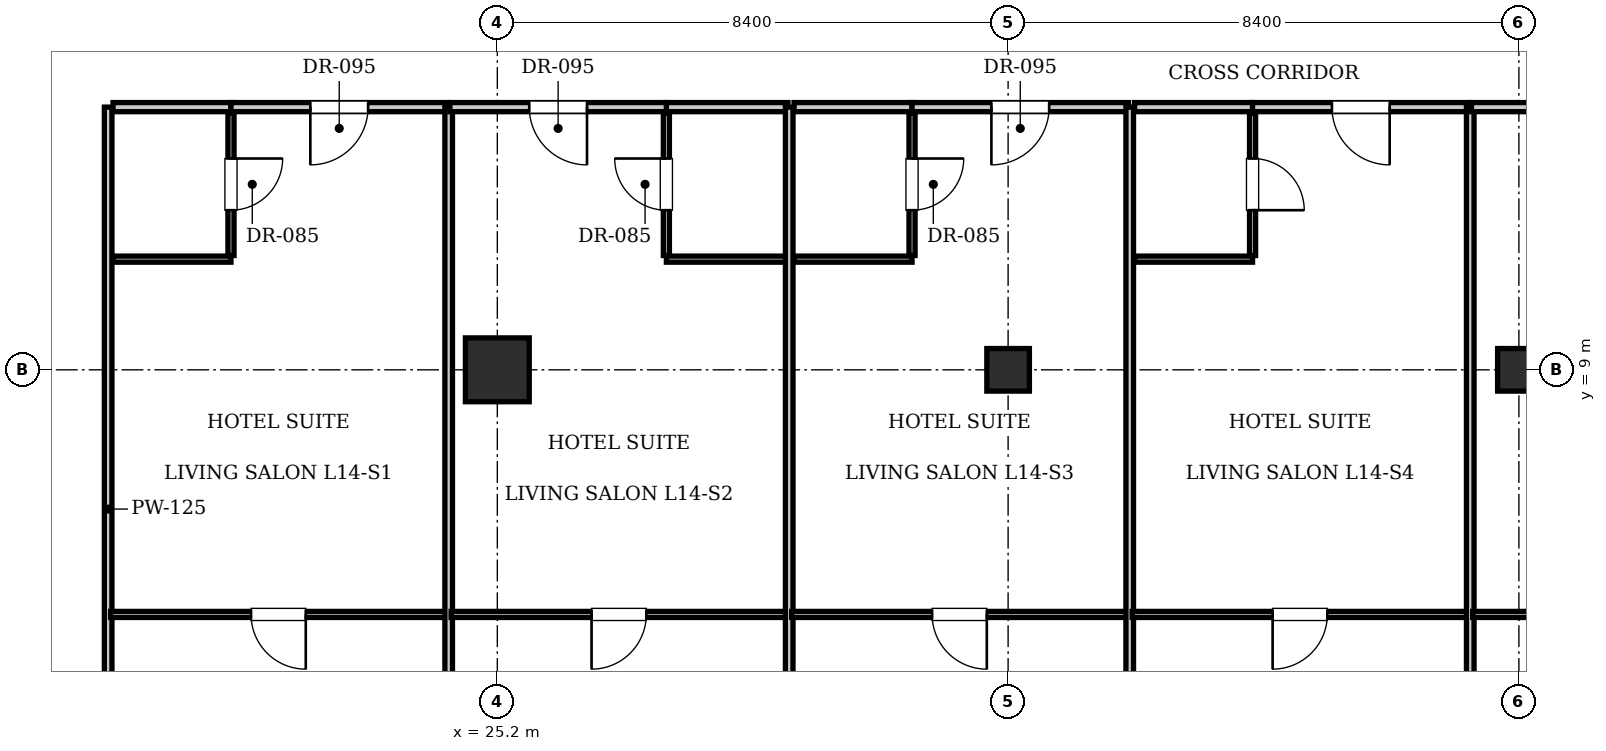
"""IFC4 building model, lengths in metres.
Left out: names, types, materials, properties, quantities, classifications, styles, units other than length and angle.
Written with IfcOpenShell. Run it as: python <this file> out.ifc"""

import sys

from ifc_helpers import new_model, si_unit, direction, frame, frame_2d, origin, origin_2d, place, context, subcontext, project, spatial, rectangle, i_section, extrude, element, fill, save


model = new_model("IFC4")
c1 = context("Model", 3, precision=1e-05, world=origin(), true_north=direction((0.0, 1.0)))
c2 = subcontext(c1, "Body", "Model", "MODEL_VIEW")
j1 = project(units=[si_unit("LENGTHUNIT", "METRE"), si_unit("PLANEANGLEUNIT", "RADIAN")], contexts=[c1])
p1 = place(None, origin())
s1 = spatial("IfcSite", under=j1, at=p1, CompositionType="ELEMENT")
p2 = place(p1, origin())
s2 = spatial("IfcBuilding", under=s1, at=p2, CompositionType="ELEMENT")
p3 = place(p2, frame((0.0, 0.0, 61.6)))
s3 = spatial("IfcBuildingStorey", under=s2, at=p3, CompositionType="ELEMENT", Elevation=61.6)
p4 = place(p3, frame((25.2, 9.0, 0.0), z_axis=(0.0, 0.0, 1.0), x_axis=(1.0, 0.0, 0.0)))
e1 = element("IfcColumn", 1, at=p4, inside=s3, PredefinedType="COLUMN", context=c2, shape_type="SweptSolid", body=[
    extrude(rectangle(XDim=1.05, YDim=1.05, at=origin_2d()), origin(), (0.0, 0.0, 1.0), 3.85),
])
for number, where, z_axis, x_axis in (
    (2, (33.6, 9.0, 0.0), (0.0, 0.0, 1.0), (1.0, 0.0, 0.0)),
    (3, (42.0, 9.0, 0.0), (0.0, 0.0, 1.0), (1.0, 0.0, 0.0)),
):
    element("IfcColumn", number, at=place(p3, frame(where, z_axis=z_axis, x_axis=x_axis)), inside=s3, PredefinedType="COLUMN", context=c2, shape_type="SweptSolid", body=[
        extrude(i_section(OverallWidth=0.7, OverallDepth=0.7, WebThickness=0.028, FlangeThickness=0.044, at=origin_2d()), origin(), (0.0, 0.0, 1.0), 3.85),
    ])
p5 = place(p3, frame((18.8, 0.1, 0.0), z_axis=(0.0, 0.0, 1.0), x_axis=(0.0, 1.0, 0.0)))
e4 = element("IfcWall", 4, at=p5, inside=s3, PredefinedType="PARTITIONING", context=c2, shape_type="SweptSolid", body=[
    extrude(rectangle(XDim=13.22, YDim=0.125, at=frame_2d((6.61, 0.0))), origin(), (0.0, 0.0, 1.0), 3.61),
])
p6 = place(p3, frame((18.88, 13.32, 0.0), z_axis=(0.0, 0.0, 1.0), x_axis=(1.0, 0.0, 0.0)))
e5 = element("IfcWall", 5, at=p6, inside=s3, PredefinedType="PARTITIONING", context=c2, shape_type="SweptSolid", body=[
    extrude(rectangle(XDim=1.94, YDim=0.15, at=frame_2d((0.97, 0.0))), origin(), (0.0, 0.0, 1.0), 3.61),
])
p7 = place(p3, frame((18.88, 10.82, 0.0), z_axis=(0.0, 0.0, 1.0), x_axis=(1.0, 0.0, 0.0)))
e6 = element("IfcWall", 6, at=p7, inside=s3, PredefinedType="PARTITIONING", context=c2, shape_type="SweptSolid", body=[
    extrude(rectangle(XDim=1.94, YDim=0.1, at=frame_2d((0.97, 0.0))), origin(), (0.0, 0.0, 1.0), 3.61),
])
p8 = place(p3, frame((20.82, 10.88, 0.0), z_axis=(0.0, 0.0, 1.0), x_axis=(0.0, 1.0, 0.0)))
e7 = element("IfcWall", 7, at=p8, inside=s3, PredefinedType="PARTITIONING", context=c2, shape_type="SweptSolid", body=[
    extrude(rectangle(XDim=2.34, YDim=0.1, at=frame_2d((1.17, 0.0))), origin(), (0.0, 0.0, 1.0), 3.61),
])
p9 = place(p8, frame((0.745, 0.0, 0.0)))
e8 = element("IfcOpeningElement", 8, at=p9, cuts=e7, PredefinedType="OPENING", context=c2, shape_type="SweptSolid", body=[
    extrude(rectangle(XDim=0.85, YDim=2.1, at=frame_2d((0.425, 1.05))), frame((0.0, 0.06, 0.0), z_axis=(0.0, -1.0, 0.0), x_axis=(1.0, 0.0, 0.0)), (0.0, 0.0, 1.0), 0.12),
])
p10 = place(p3, frame((20.82, 13.32, 0.0), z_axis=(0.0, 0.0, 1.0), x_axis=(1.0, 0.0, 0.0)))
e9 = element("IfcWall", 9, at=p10, inside=s3, PredefinedType="PARTITIONING", context=c2, shape_type="SweptSolid", body=[
    extrude(rectangle(XDim=3.56, YDim=0.15, at=frame_2d((1.78, 0.0))), origin(), (0.0, 0.0, 1.0), 3.61),
])
p11 = place(p10, frame((1.305, 0.0, 0.0)))
e10 = element("IfcOpeningElement", 10, at=p11, cuts=e9, PredefinedType="OPENING", context=c2, shape_type="SweptSolid", body=[
    extrude(rectangle(XDim=0.95, YDim=2.15, at=frame_2d((0.475, 1.075))), frame((0.0, 0.085, 0.0), z_axis=(0.0, -1.0, 0.0), x_axis=(1.0, 0.0, 0.0)), (0.0, 0.0, 1.0), 0.17),
])
p12 = place(p3, frame((18.84, 4.977, 0.0), z_axis=(0.0, 0.0, 1.0), x_axis=(1.0, 0.0, 0.0)))
e11 = element("IfcWall", 11, at=p12, inside=s3, PredefinedType="PARTITIONING", context=c2, shape_type="SweptSolid", body=[
    extrude(rectangle(XDim=5.52, YDim=0.1, at=frame_2d((2.76, 0.0))), origin(), (0.0, 0.0, 1.0), 3.61),
])
p13 = place(p12, frame((2.31, 0.0, 0.0)))
e12 = element("IfcOpeningElement", 12, at=p13, cuts=e11, PredefinedType="OPENING", context=c2, shape_type="SweptSolid", body=[
    extrude(rectangle(XDim=0.9, YDim=2.1, at=frame_2d((0.45, 1.05))), frame((0.0, 0.06, 0.0), z_axis=(0.0, -1.0, 0.0), x_axis=(1.0, 0.0, 0.0)), (0.0, 0.0, 1.0), 0.12),
])
p14 = place(p3, frame((24.4, 0.1, 0.0), z_axis=(0.0, 0.0, 1.0), x_axis=(0.0, 1.0, 0.0)))
e13 = element("IfcWall", 13, at=p14, inside=s3, PredefinedType="PARTITIONING", context=c2, shape_type="SweptSolid", body=[
    extrude(rectangle(XDim=13.22, YDim=0.125, at=frame_2d((6.61, 0.0))), origin(), (0.0, 0.0, 1.0), 3.61),
])
p15 = place(p3, frame((27.98, 13.32, 0.0), z_axis=(0.0, 0.0, 1.0), x_axis=(1.0, 0.0, 0.0)))
e14 = element("IfcWall", 14, at=p15, inside=s3, PredefinedType="PARTITIONING", context=c2, shape_type="SweptSolid", body=[
    extrude(rectangle(XDim=2.0, YDim=0.15, at=frame_2d((1.0, 0.0))), origin(), (0.0, 0.0, 1.0), 3.61),
])
p16 = place(p3, frame((27.98, 10.82, 0.0), z_axis=(0.0, 0.0, 1.0), x_axis=(1.0, 0.0, 0.0)))
e15 = element("IfcWall", 15, at=p16, inside=s3, PredefinedType="PARTITIONING", context=c2, shape_type="SweptSolid", body=[
    extrude(rectangle(XDim=1.98, YDim=0.1, at=frame_2d((0.99, 0.0))), origin(), (0.0, 0.0, 1.0), 3.61),
])
p17 = place(p3, frame((27.98, 10.88, 0.0), z_axis=(0.0, 0.0, 1.0), x_axis=(0.0, 1.0, 0.0)))
e16 = element("IfcWall", 16, at=p17, inside=s3, PredefinedType="PARTITIONING", context=c2, shape_type="SweptSolid", body=[
    extrude(rectangle(XDim=2.34, YDim=0.1, at=frame_2d((1.17, 0.0))), origin(), (0.0, 0.0, 1.0), 3.61),
])
p18 = place(p17, frame((0.745, 0.0, 0.0)))
e17 = element("IfcOpeningElement", 17, at=p18, cuts=e16, PredefinedType="OPENING", context=c2, shape_type="SweptSolid", body=[
    extrude(rectangle(XDim=0.85, YDim=2.1, at=frame_2d((0.425, 1.05))), frame((0.0, 0.06, 0.0), z_axis=(0.0, -1.0, 0.0), x_axis=(1.0, 0.0, 0.0)), (0.0, 0.0, 1.0), 0.12),
])
p19 = place(p3, frame((24.42, 13.32, 0.0), z_axis=(0.0, 0.0, 1.0), x_axis=(1.0, 0.0, 0.0)))
e18 = element("IfcWall", 18, at=p19, inside=s3, PredefinedType="PARTITIONING", context=c2, shape_type="SweptSolid", body=[
    extrude(rectangle(XDim=3.56, YDim=0.15, at=frame_2d((1.78, 0.0))), origin(), (0.0, 0.0, 1.0), 3.61),
])
p20 = place(p19, frame((1.305, 0.0, 0.0)))
e19 = element("IfcOpeningElement", 19, at=p20, cuts=e18, PredefinedType="OPENING", context=c2, shape_type="SweptSolid", body=[
    extrude(rectangle(XDim=0.95, YDim=2.15, at=frame_2d((0.475, 1.075))), frame((0.0, 0.085, 0.0), z_axis=(0.0, -1.0, 0.0), x_axis=(1.0, 0.0, 0.0)), (0.0, 0.0, 1.0), 0.17),
])
p21 = place(p3, frame((24.44, 4.977, 0.0), z_axis=(0.0, 0.0, 1.0), x_axis=(1.0, 0.0, 0.0)))
e20 = element("IfcWall", 20, at=p21, inside=s3, PredefinedType="PARTITIONING", context=c2, shape_type="SweptSolid", body=[
    extrude(rectangle(XDim=5.52, YDim=0.1, at=frame_2d((2.76, 0.0))), origin(), (0.0, 0.0, 1.0), 3.61),
])
p22 = place(p21, frame((2.31, 0.0, 0.0)))
e21 = element("IfcOpeningElement", 21, at=p22, cuts=e20, PredefinedType="OPENING", context=c2, shape_type="SweptSolid", body=[
    extrude(rectangle(XDim=0.9, YDim=2.1, at=frame_2d((0.45, 1.05))), frame((0.0, 0.06, 0.0), z_axis=(0.0, -1.0, 0.0), x_axis=(1.0, 0.0, 0.0)), (0.0, 0.0, 1.0), 0.12),
])
p23 = place(p3, frame((30.0, 0.1, 0.0), z_axis=(0.0, 0.0, 1.0), x_axis=(0.0, 1.0, 0.0)))
e22 = element("IfcWall", 22, at=p23, inside=s3, PredefinedType="PARTITIONING", context=c2, shape_type="SweptSolid", body=[
    extrude(rectangle(XDim=13.22, YDim=0.125, at=frame_2d((6.61, 0.0))), origin(), (0.0, 0.0, 1.0), 3.61),
])
p24 = place(p3, frame((30.08, 13.32, 0.0), z_axis=(0.0, 0.0, 1.0), x_axis=(1.0, 0.0, 0.0)))
e23 = element("IfcWall", 23, at=p24, inside=s3, PredefinedType="PARTITIONING", context=c2, shape_type="SweptSolid", body=[
    extrude(rectangle(XDim=1.94, YDim=0.15, at=frame_2d((0.97, 0.0))), origin(), (0.0, 0.0, 1.0), 3.61),
])
p25 = place(p3, frame((30.08, 10.82, 0.0), z_axis=(0.0, 0.0, 1.0), x_axis=(1.0, 0.0, 0.0)))
e24 = element("IfcWall", 24, at=p25, inside=s3, PredefinedType="PARTITIONING", context=c2, shape_type="SweptSolid", body=[
    extrude(rectangle(XDim=1.94, YDim=0.1, at=frame_2d((0.97, 0.0))), origin(), (0.0, 0.0, 1.0), 3.61),
])
p26 = place(p3, frame((32.02, 10.88, 0.0), z_axis=(0.0, 0.0, 1.0), x_axis=(0.0, 1.0, 0.0)))
e25 = element("IfcWall", 25, at=p26, inside=s3, PredefinedType="PARTITIONING", context=c2, shape_type="SweptSolid", body=[
    extrude(rectangle(XDim=2.34, YDim=0.1, at=frame_2d((1.17, 0.0))), origin(), (0.0, 0.0, 1.0), 3.61),
])
p27 = place(p26, frame((0.745, 0.0, 0.0)))
e26 = element("IfcOpeningElement", 26, at=p27, cuts=e25, PredefinedType="OPENING", context=c2, shape_type="SweptSolid", body=[
    extrude(rectangle(XDim=0.85, YDim=2.1, at=frame_2d((0.425, 1.05))), frame((0.0, 0.06, 0.0), z_axis=(0.0, -1.0, 0.0), x_axis=(1.0, 0.0, 0.0)), (0.0, 0.0, 1.0), 0.12),
])
p28 = place(p3, frame((32.02, 13.32, 0.0), z_axis=(0.0, 0.0, 1.0), x_axis=(1.0, 0.0, 0.0)))
e27 = element("IfcWall", 27, at=p28, inside=s3, PredefinedType="PARTITIONING", context=c2, shape_type="SweptSolid", body=[
    extrude(rectangle(XDim=3.56, YDim=0.15, at=frame_2d((1.78, 0.0))), origin(), (0.0, 0.0, 1.0), 3.61),
])
p29 = place(p28, frame((1.305, 0.0, 0.0)))
e28 = element("IfcOpeningElement", 28, at=p29, cuts=e27, PredefinedType="OPENING", context=c2, shape_type="SweptSolid", body=[
    extrude(rectangle(XDim=0.95, YDim=2.15, at=frame_2d((0.475, 1.075))), frame((0.0, 0.085, 0.0), z_axis=(0.0, -1.0, 0.0), x_axis=(1.0, 0.0, 0.0)), (0.0, 0.0, 1.0), 0.17),
])
p30 = place(p3, frame((30.04, 4.977, 0.0), z_axis=(0.0, 0.0, 1.0), x_axis=(1.0, 0.0, 0.0)))
e29 = element("IfcWall", 29, at=p30, inside=s3, PredefinedType="PARTITIONING", context=c2, shape_type="SweptSolid", body=[
    extrude(rectangle(XDim=5.52, YDim=0.1, at=frame_2d((2.76, 0.0))), origin(), (0.0, 0.0, 1.0), 3.61),
])
p31 = place(p30, frame((2.31, 0.0, 0.0)))
e30 = element("IfcOpeningElement", 30, at=p31, cuts=e29, PredefinedType="OPENING", context=c2, shape_type="SweptSolid", body=[
    extrude(rectangle(XDim=0.9, YDim=2.1, at=frame_2d((0.45, 1.05))), frame((0.0, 0.06, 0.0), z_axis=(0.0, -1.0, 0.0), x_axis=(1.0, 0.0, 0.0)), (0.0, 0.0, 1.0), 0.12),
])
p32 = place(p3, frame((35.6, 0.1, 0.0), z_axis=(0.0, 0.0, 1.0), x_axis=(0.0, 1.0, 0.0)))
e31 = element("IfcWall", 31, at=p32, inside=s3, PredefinedType="PARTITIONING", context=c2, shape_type="SweptSolid", body=[
    extrude(rectangle(XDim=13.22, YDim=0.125, at=frame_2d((6.61, 0.0))), origin(), (0.0, 0.0, 1.0), 3.61),
])
p33 = place(p3, frame((35.68, 13.32, 0.0), z_axis=(0.0, 0.0, 1.0), x_axis=(1.0, 0.0, 0.0)))
e32 = element("IfcWall", 32, at=p33, inside=s3, PredefinedType="PARTITIONING", context=c2, shape_type="SweptSolid", body=[
    extrude(rectangle(XDim=1.94, YDim=0.15, at=frame_2d((0.97, 0.0))), origin(), (0.0, 0.0, 1.0), 3.61),
])
p34 = place(p3, frame((35.68, 10.82, 0.0), z_axis=(0.0, 0.0, 1.0), x_axis=(1.0, 0.0, 0.0)))
e33 = element("IfcWall", 33, at=p34, inside=s3, PredefinedType="PARTITIONING", context=c2, shape_type="SweptSolid", body=[
    extrude(rectangle(XDim=1.94, YDim=0.1, at=frame_2d((0.97, 0.0))), origin(), (0.0, 0.0, 1.0), 3.61),
])
p35 = place(p3, frame((37.62, 10.88, 0.0), z_axis=(0.0, 0.0, 1.0), x_axis=(0.0, 1.0, 0.0)))
e34 = element("IfcWall", 34, at=p35, inside=s3, PredefinedType="PARTITIONING", context=c2, shape_type="SweptSolid", body=[
    extrude(rectangle(XDim=2.34, YDim=0.1, at=frame_2d((1.17, 0.0))), origin(), (0.0, 0.0, 1.0), 3.61),
])
p36 = place(p35, frame((0.745, 0.0, 0.0)))
e35 = element("IfcOpeningElement", 35, at=p36, cuts=e34, PredefinedType="OPENING", context=c2, shape_type="SweptSolid", body=[
    extrude(rectangle(XDim=0.85, YDim=2.1, at=frame_2d((0.425, 1.05))), frame((0.0, 0.06, 0.0), z_axis=(0.0, -1.0, 0.0), x_axis=(1.0, 0.0, 0.0)), (0.0, 0.0, 1.0), 0.12),
])
p37 = place(p3, frame((37.62, 13.32, 0.0), z_axis=(0.0, 0.0, 1.0), x_axis=(1.0, 0.0, 0.0)))
e36 = element("IfcWall", 36, at=p37, inside=s3, PredefinedType="PARTITIONING", context=c2, shape_type="SweptSolid", body=[
    extrude(rectangle(XDim=3.56, YDim=0.15, at=frame_2d((1.78, 0.0))), origin(), (0.0, 0.0, 1.0), 3.61),
])
p38 = place(p37, frame((1.305, 0.0, 0.0)))
e37 = element("IfcOpeningElement", 37, at=p38, cuts=e36, PredefinedType="OPENING", context=c2, shape_type="SweptSolid", body=[
    extrude(rectangle(XDim=0.95, YDim=2.15, at=frame_2d((0.475, 1.075))), frame((0.0, 0.085, 0.0), z_axis=(0.0, -1.0, 0.0), x_axis=(1.0, 0.0, 0.0)), (0.0, 0.0, 1.0), 0.17),
])
p39 = place(p3, frame((35.64, 4.977, 0.0), z_axis=(0.0, 0.0, 1.0), x_axis=(1.0, 0.0, 0.0)))
e38 = element("IfcWall", 38, at=p39, inside=s3, PredefinedType="PARTITIONING", context=c2, shape_type="SweptSolid", body=[
    extrude(rectangle(XDim=5.52, YDim=0.1, at=frame_2d((2.76, 0.0))), origin(), (0.0, 0.0, 1.0), 3.61),
])
p40 = place(p39, frame((2.31, 0.0, 0.0)))
e39 = element("IfcOpeningElement", 39, at=p40, cuts=e38, PredefinedType="OPENING", context=c2, shape_type="SweptSolid", body=[
    extrude(rectangle(XDim=0.9, YDim=2.1, at=frame_2d((0.45, 1.05))), frame((0.0, 0.06, 0.0), z_axis=(0.0, -1.0, 0.0), x_axis=(1.0, 0.0, 0.0)), (0.0, 0.0, 1.0), 0.12),
])
p41 = place(p3, frame((41.2, 0.1, 0.0), z_axis=(0.0, 0.0, 1.0), x_axis=(0.0, 1.0, 0.0)))
e40 = element("IfcWall", 40, at=p41, inside=s3, PredefinedType="PARTITIONING", context=c2, shape_type="SweptSolid", body=[
    extrude(rectangle(XDim=13.22, YDim=0.125, at=frame_2d((6.61, 0.0))), origin(), (0.0, 0.0, 1.0), 3.61),
])
p42 = place(p3, frame((41.22, 13.32, 0.0), z_axis=(0.0, 0.0, 1.0), x_axis=(1.0, 0.0, 0.0)))
e41 = element("IfcWall", 41, at=p42, inside=s3, PredefinedType="PARTITIONING", context=c2, shape_type="SweptSolid", body=[
    extrude(rectangle(XDim=3.56, YDim=0.15, at=frame_2d((1.78, 0.0))), origin(), (0.0, 0.0, 1.0), 3.61),
])
p43 = place(p42, frame((1.305, 0.0, 0.0)))
e42 = element("IfcOpeningElement", 42, at=p43, cuts=e41, PredefinedType="OPENING", context=c2, shape_type="SweptSolid", body=[
    extrude(rectangle(XDim=0.95, YDim=2.15, at=frame_2d((0.475, 1.075))), frame((0.0, 0.085, 0.0), z_axis=(0.0, -1.0, 0.0), x_axis=(1.0, 0.0, 0.0)), (0.0, 0.0, 1.0), 0.17),
])
p44 = place(p3, frame((41.24, 4.977, 0.0), z_axis=(0.0, 0.0, 1.0), x_axis=(1.0, 0.0, 0.0)))
e43 = element("IfcWall", 43, at=p44, inside=s3, PredefinedType="PARTITIONING", context=c2, shape_type="SweptSolid", body=[
    extrude(rectangle(XDim=5.52, YDim=0.1, at=frame_2d((2.76, 0.0))), origin(), (0.0, 0.0, 1.0), 3.61),
])
p45 = place(p44, frame((2.31, 0.0, 0.0)))
e44 = element("IfcOpeningElement", 44, at=p45, cuts=e43, PredefinedType="OPENING", context=c2, shape_type="SweptSolid", body=[
    extrude(rectangle(XDim=0.9, YDim=2.1, at=frame_2d((0.45, 1.05))), frame((0.0, 0.06, 0.0), z_axis=(0.0, -1.0, 0.0), x_axis=(1.0, 0.0, 0.0)), (0.0, 0.0, 1.0), 0.12),
])
p46 = place(p9, frame((0.85, 0.0, 0.0), z_axis=(0.0, 0.0, 1.0), x_axis=(-1.0, 0.0, 0.0)))
e45 = element("IfcDoor", 45, at=p46, inside=s3, OperationType="SINGLE_SWING_LEFT", PredefinedType="DOOR", context=c2, shape_type="SweptSolid", body=[
    extrude(rectangle(XDim=0.85, YDim=2.1, at=frame_2d((0.425, 1.05))), frame((0.0, 0.025, 0.0), z_axis=(0.0, -1.0, 0.0), x_axis=(1.0, 0.0, 0.0)), (0.0, 0.0, 1.0), 0.05),
])
fill(e8, e45)
p47 = place(p11, frame((0.95, 0.0, 0.0), z_axis=(0.0, 0.0, 1.0), x_axis=(-1.0, 0.0, 0.0)))
e46 = element("IfcDoor", 46, at=p47, inside=s3, OperationType="SINGLE_SWING_RIGHT", PredefinedType="DOOR", context=c2, shape_type="SweptSolid", body=[
    extrude(rectangle(XDim=0.95, YDim=2.15, at=frame_2d((0.475, 1.075))), frame((0.0, 0.025, 0.0), z_axis=(0.0, -1.0, 0.0), x_axis=(1.0, 0.0, 0.0)), (0.0, 0.0, 1.0), 0.05),
])
fill(e10, e46)
p48 = place(p13, frame((0.9, 0.0, 0.0), z_axis=(0.0, 0.0, 1.0), x_axis=(-1.0, 0.0, 0.0)))
e47 = element("IfcDoor", 47, at=p48, inside=s3, OperationType="SINGLE_SWING_LEFT", PredefinedType="DOOR", context=c2, shape_type="SweptSolid", body=[
    extrude(rectangle(XDim=0.9, YDim=2.1, at=frame_2d((0.45, 1.05))), frame((0.0, 0.025, 0.0), z_axis=(0.0, -1.0, 0.0), x_axis=(1.0, 0.0, 0.0)), (0.0, 0.0, 1.0), 0.05),
])
fill(e12, e47)
p49 = place(p18, origin())
e48 = element("IfcDoor", 48, at=p49, inside=s3, OperationType="SINGLE_SWING_RIGHT", PredefinedType="DOOR", context=c2, shape_type="SweptSolid", body=[
    extrude(rectangle(XDim=0.85, YDim=2.1, at=frame_2d((0.425, 1.05))), frame((0.0, 0.025, 0.0), z_axis=(0.0, -1.0, 0.0), x_axis=(1.0, 0.0, 0.0)), (0.0, 0.0, 1.0), 0.05),
])
fill(e17, e48)
p50 = place(p20, frame((0.95, 0.0, 0.0), z_axis=(0.0, 0.0, 1.0), x_axis=(-1.0, 0.0, 0.0)))
e49 = element("IfcDoor", 49, at=p50, inside=s3, OperationType="SINGLE_SWING_LEFT", PredefinedType="DOOR", context=c2, shape_type="SweptSolid", body=[
    extrude(rectangle(XDim=0.95, YDim=2.15, at=frame_2d((0.475, 1.075))), frame((0.0, 0.025, 0.0), z_axis=(0.0, -1.0, 0.0), x_axis=(1.0, 0.0, 0.0)), (0.0, 0.0, 1.0), 0.05),
])
fill(e19, e49)
p51 = place(p22, frame((0.9, 0.0, 0.0), z_axis=(0.0, 0.0, 1.0), x_axis=(-1.0, 0.0, 0.0)))
e50 = element("IfcDoor", 50, at=p51, inside=s3, OperationType="SINGLE_SWING_RIGHT", PredefinedType="DOOR", context=c2, shape_type="SweptSolid", body=[
    extrude(rectangle(XDim=0.9, YDim=2.1, at=frame_2d((0.45, 1.05))), frame((0.0, 0.025, 0.0), z_axis=(0.0, -1.0, 0.0), x_axis=(1.0, 0.0, 0.0)), (0.0, 0.0, 1.0), 0.05),
])
fill(e21, e50)
p52 = place(p27, frame((0.85, 0.0, 0.0), z_axis=(0.0, 0.0, 1.0), x_axis=(-1.0, 0.0, 0.0)))
e51 = element("IfcDoor", 51, at=p52, inside=s3, OperationType="SINGLE_SWING_LEFT", PredefinedType="DOOR", context=c2, shape_type="SweptSolid", body=[
    extrude(rectangle(XDim=0.85, YDim=2.1, at=frame_2d((0.425, 1.05))), frame((0.0, 0.025, 0.0), z_axis=(0.0, -1.0, 0.0), x_axis=(1.0, 0.0, 0.0)), (0.0, 0.0, 1.0), 0.05),
])
fill(e26, e51)
p53 = place(p29, frame((0.95, 0.0, 0.0), z_axis=(0.0, 0.0, 1.0), x_axis=(-1.0, 0.0, 0.0)))
e52 = element("IfcDoor", 52, at=p53, inside=s3, OperationType="SINGLE_SWING_RIGHT", PredefinedType="DOOR", context=c2, shape_type="SweptSolid", body=[
    extrude(rectangle(XDim=0.95, YDim=2.15, at=frame_2d((0.475, 1.075))), frame((0.0, 0.025, 0.0), z_axis=(0.0, -1.0, 0.0), x_axis=(1.0, 0.0, 0.0)), (0.0, 0.0, 1.0), 0.05),
])
fill(e28, e52)
p54 = place(p31, frame((0.9, 0.0, 0.0), z_axis=(0.0, 0.0, 1.0), x_axis=(-1.0, 0.0, 0.0)))
e53 = element("IfcDoor", 53, at=p54, inside=s3, OperationType="SINGLE_SWING_LEFT", PredefinedType="DOOR", context=c2, shape_type="SweptSolid", body=[
    extrude(rectangle(XDim=0.9, YDim=2.1, at=frame_2d((0.45, 1.05))), frame((0.0, 0.025, 0.0), z_axis=(0.0, -1.0, 0.0), x_axis=(1.0, 0.0, 0.0)), (0.0, 0.0, 1.0), 0.05),
])
fill(e30, e53)
p55 = place(p36, frame((0.85, 0.0, 0.0), z_axis=(0.0, 0.0, 1.0), x_axis=(-1.0, 0.0, 0.0)))
e54 = element("IfcDoor", 54, at=p55, inside=s3, OperationType="SINGLE_SWING_RIGHT", PredefinedType="DOOR", context=c2, shape_type="SweptSolid", body=[
    extrude(rectangle(XDim=0.85, YDim=2.1, at=frame_2d((0.425, 1.05))), frame((0.0, 0.025, 0.0), z_axis=(0.0, -1.0, 0.0), x_axis=(1.0, 0.0, 0.0)), (0.0, 0.0, 1.0), 0.05),
])
fill(e35, e54)
p56 = place(p38, frame((0.95, 0.0, 0.0), z_axis=(0.0, 0.0, 1.0), x_axis=(-1.0, 0.0, 0.0)))
e55 = element("IfcDoor", 55, at=p56, inside=s3, OperationType="SINGLE_SWING_LEFT", PredefinedType="DOOR", context=c2, shape_type="SweptSolid", body=[
    extrude(rectangle(XDim=0.95, YDim=2.15, at=frame_2d((0.475, 1.075))), frame((0.0, 0.025, 0.0), z_axis=(0.0, -1.0, 0.0), x_axis=(1.0, 0.0, 0.0)), (0.0, 0.0, 1.0), 0.05),
])
fill(e37, e55)
p57 = place(p40, frame((0.9, 0.0, 0.0), z_axis=(0.0, 0.0, 1.0), x_axis=(-1.0, 0.0, 0.0)))
e56 = element("IfcDoor", 56, at=p57, inside=s3, OperationType="SINGLE_SWING_RIGHT", PredefinedType="DOOR", context=c2, shape_type="SweptSolid", body=[
    extrude(rectangle(XDim=0.9, YDim=2.1, at=frame_2d((0.45, 1.05))), frame((0.0, 0.025, 0.0), z_axis=(0.0, -1.0, 0.0), x_axis=(1.0, 0.0, 0.0)), (0.0, 0.0, 1.0), 0.05),
])
fill(e39, e56)
save(model, sys.argv[1])
